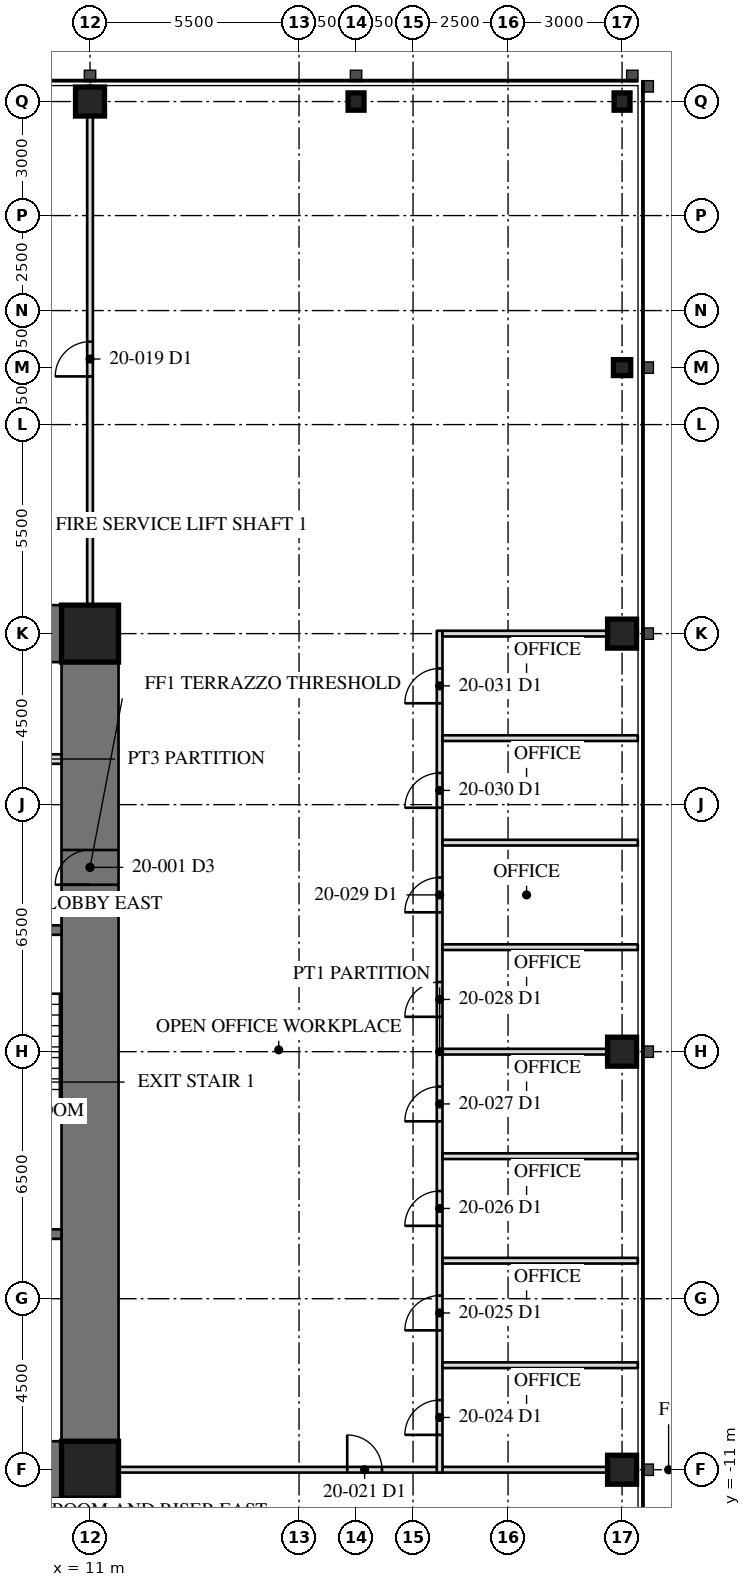
"""IFC4 building model, lengths in metres.
Left out: names, types, materials, properties, quantities, classifications, styles, units other than length and angle.
Written with IfcOpenShell. Run it as: python <this file> out.ifc"""

import sys

from ifc_helpers import new_model, si_unit, direction, frame, frame_2d, origin, origin_2d, place, context, subcontext, project, spatial, rectangle, hollow_rectangle, i_section, extrude, element, fill, save


model = new_model("IFC4")
c1 = context("Model", 3, precision=1e-05, world=origin(), true_north=direction((0.0, 1.0)))
c2 = subcontext(c1, "Body", "Model", "MODEL_VIEW")
j1 = project(units=[si_unit("LENGTHUNIT", "METRE"), si_unit("PLANEANGLEUNIT", "RADIAN")], contexts=[c1])
p1 = place(None, origin())
s1 = spatial("IfcSite", under=j1, at=p1, CompositionType="ELEMENT")
p2 = place(p1, origin())
s2 = spatial("IfcBuilding", under=s1, at=p2, CompositionType="ELEMENT")
p3 = place(p2, frame((0.0, 0.0, 85.7)))
s3 = spatial("IfcBuildingStorey", under=s2, at=p3, CompositionType="ELEMENT", Elevation=85.7)
for number, where, z_axis, x_axis in (
    (1, (25.0, -11.0, 0.0), (0.0, 0.0, 1.0), (0.0, 1.0, 0.0)),
    (2, (25.0, 0.0, 0.0), (0.0, 0.0, 1.0), (0.0, 1.0, 0.0)),
    (3, (25.0, 11.0, 0.0), (0.0, 0.0, 1.0), (0.0, 1.0, 0.0)),
):
    element("IfcColumn", number, at=place(p3, frame(where, z_axis=z_axis, x_axis=x_axis)), inside=s3, PredefinedType="COLUMN", context=c2, shape_type="SweptSolid", body=[
        extrude(hollow_rectangle(XDim=0.762, YDim=0.762, WallThickness=0.127, at=origin_2d()), origin(), (0.0, 0.0, 1.0), 4.1),
    ])
for number, where, z_axis, x_axis in (
    (4, (25.0, 18.0, 0.0), (0.0, 0.0, 1.0), (0.0, 1.0, 0.0)),
    (5, (25.0, 25.0, 0.0), (0.0, 0.0, 1.0), (1.0, 0.0, 0.0)),
    (6, (18.0, 25.0, 0.0), (0.0, 0.0, 1.0), (1.0, 0.0, 0.0)),
):
    element("IfcColumn", number, at=place(p3, frame(where, z_axis=z_axis, x_axis=x_axis)), inside=s3, PredefinedType="COLUMN", context=c2, shape_type="SweptSolid", body=[
        extrude(i_section(OverallWidth=0.419, OverallDepth=0.455, WebThickness=0.042, FlangeThickness=0.068, at=origin_2d()), origin(), (0.0, 0.0, 1.0), 4.1),
    ])
p4 = place(p3, frame((11.0, 25.0, 0.0), z_axis=(0.0, 0.0, 1.0), x_axis=(1.0, 0.0, 0.0)))
e7 = element("IfcColumn", 7, at=p4, inside=s3, PredefinedType="COLUMN", context=c2, shape_type="SweptSolid", body=[
    extrude(hollow_rectangle(XDim=0.762, YDim=0.762, WallThickness=0.127, at=origin_2d()), origin(), (0.0, 0.0, 1.0), 4.1),
])
p5 = place(p3, frame((11.0, -11.0, 0.0), z_axis=(0.0, 0.0, 1.0), x_axis=(0.0, 1.0, 0.0)))
e8 = element("IfcWall", 8, at=p5, inside=s3, PredefinedType="SHEAR", context=c2, shape_type="SweptSolid", body=[
    extrude(rectangle(XDim=22.0, YDim=1.5, at=frame_2d((11.0, 0.0))), origin(), (0.0, 0.0, 1.0), 4.1),
])
p6 = place(p5, frame((15.393, 0.0, 0.0)))
e9 = element("IfcOpeningElement", 9, at=p6, cuts=e8, PredefinedType="OPENING", context=c2, shape_type="SweptSolid", body=[
    extrude(rectangle(XDim=0.915, YDim=2.134, at=frame_2d((0.458, 1.067))), frame((0.0, 0.76, 0.0), z_axis=(0.0, -1.0, 0.0), x_axis=(1.0, 0.0, 0.0)), (0.0, 0.0, 1.0), 1.52),
])
for number, where, z_axis, x_axis in (
    (10, (11.0, 11.0, 0.0), (0.0, 0.0, 1.0), (-1.0, 0.0, 0.0)),
    (11, (6.5, -11.0, 0.0), (0.0, 0.0, 1.0), (1.0, 0.0, 0.0)),
):
    element("IfcWall", number, at=place(p3, frame(where, z_axis=z_axis, x_axis=x_axis)), inside=s3, PredefinedType="SHEAR", context=c2, shape_type="SweptSolid", body=[
        extrude(rectangle(XDim=4.5, YDim=1.5, at=frame_2d((2.25, 0.0))), origin(), (0.0, 0.0, 1.0), 4.1),
    ])
for number, where, z_axis, x_axis in (
    (12, (11.0, 11.0, 0.0), (0.0, 0.0, 1.0), (1.0, 0.0, 0.0)),
    (13, (11.0, -11.0, 0.0), (0.0, 0.0, 1.0), (1.0, 0.0, 0.0)),
):
    element("IfcColumn", number, at=place(p3, frame(where, z_axis=z_axis, x_axis=x_axis)), inside=s3, PredefinedType="COLUMN", context=c2, shape_type="SweptSolid", body=[
        extrude(hollow_rectangle(XDim=1.499, YDim=1.499, WallThickness=0.102, at=origin_2d()), origin(), (0.0, 0.0, 1.0), 4.1),
    ])
p7 = place(p3, frame((6.95, -4.8, 0.0), z_axis=(0.0, 0.0, 1.0), x_axis=(1.0, 0.0, 0.0)))
e14 = element("IfcWall", 14, at=p7, inside=s3, PredefinedType="SOLIDWALL", context=c2, shape_type="SweptSolid", body=[
    extrude(rectangle(XDim=3.3, YDim=0.25, at=frame_2d((1.65, 0.0))), origin(), (0.0, 0.0, 1.0), 3.91),
])
p8 = place(p3, frame((6.95, 3.2, 0.0), z_axis=(0.0, 0.0, 1.0), x_axis=(1.0, 0.0, 0.0)))
e15 = element("IfcWall", 15, at=p8, inside=s3, PredefinedType="SOLIDWALL", context=c2, shape_type="SweptSolid", body=[
    extrude(rectangle(XDim=3.3, YDim=0.25, at=frame_2d((1.65, 0.0))), origin(), (0.0, 0.0, 1.0), 3.91),
])
p9 = place(p8, frame((1.116, 0.0, 0.0)))
e16 = element("IfcOpeningElement", 16, at=p9, cuts=e15, PredefinedType="OPENING", context=c2, shape_type="SweptSolid", body=[
    extrude(rectangle(XDim=1.067, YDim=2.134, at=frame_2d((0.533, 1.067))), frame((0.0, 0.135, 0.0), z_axis=(0.0, -1.0, 0.0), x_axis=(1.0, 0.0, 0.0)), (0.0, 0.0, 1.0), 0.27),
])
p10 = place(p3, frame((6.95, 7.7, 0.0), z_axis=(0.0, 0.0, 1.0), x_axis=(1.0, 0.0, 0.0)))
e17 = element("IfcWall", 17, at=p10, inside=s3, PredefinedType="PARTITIONING", context=c2, shape_type="SweptSolid", body=[
    extrude(rectangle(XDim=3.3, YDim=0.25, at=frame_2d((1.65, 0.0))), origin(), (0.0, 0.0, 1.0), 3.91),
])
p11 = place(p10, frame((0.45, 0.0, 0.0)))
e18 = element("IfcOpeningElement", 18, at=p11, cuts=e17, PredefinedType="OPENING", context=c2, shape_type="SweptSolid", body=[
    extrude(rectangle(XDim=1.219, YDim=2.134, at=frame_2d((0.609, 1.067))), frame((0.0, 0.135, 0.0), z_axis=(0.0, -1.0, 0.0), x_axis=(1.0, 0.0, 0.0)), (0.0, 0.0, 1.0), 0.27),
])
p12 = place(p3, frame((11.0, 11.75, 0.0), z_axis=(0.0, 0.0, 1.0), x_axis=(0.0, 1.0, 0.0)))
e19 = element("IfcWall", 19, at=p12, inside=s3, PredefinedType="PARTITIONING", context=c2, shape_type="SweptSolid", body=[
    extrude(rectangle(XDim=13.665, YDim=0.15, at=frame_2d((6.833, 0.0))), origin(), (0.0, 0.0, 1.0), 3.301),
])
p13 = place(p12, frame((6.018, 0.0, 0.0)))
e20 = element("IfcOpeningElement", 20, at=p13, cuts=e19, PredefinedType="OPENING", context=c2, shape_type="SweptSolid", body=[
    extrude(rectangle(XDim=0.915, YDim=2.134, at=frame_2d((0.458, 1.067))), frame((0.0, 0.085, 0.0), z_axis=(0.0, -1.0, 0.0), x_axis=(1.0, 0.0, 0.0)), (0.0, 0.0, 1.0), 0.17),
])
p14 = place(p3, frame((11.75, -11.0, 0.0), z_axis=(0.0, 0.0, 1.0), x_axis=(1.0, 0.0, 0.0)))
e21 = element("IfcWall", 21, at=p14, inside=s3, PredefinedType="PARTITIONING", context=c2, shape_type="SweptSolid", body=[
    extrude(rectangle(XDim=13.665, YDim=0.15, at=frame_2d((6.833, 0.0))), origin(), (0.0, 0.0, 1.0), 3.301),
])
p15 = place(p14, frame((6.018, 0.0, 0.0)))
e22 = element("IfcOpeningElement", 22, at=p15, cuts=e21, PredefinedType="OPENING", context=c2, shape_type="SweptSolid", body=[
    extrude(rectangle(XDim=0.915, YDim=2.134, at=frame_2d((0.458, 1.067))), frame((0.0, 0.085, 0.0), z_axis=(0.0, -1.0, 0.0), x_axis=(1.0, 0.0, 0.0)), (0.0, 0.0, 1.0), 0.17),
])
p16 = place(p3, frame((20.2, -11.075, 0.0), z_axis=(0.0, 0.0, 1.0), x_axis=(0.0, 1.0, 0.0)))
e23 = element("IfcWall", 23, at=p16, inside=s3, PredefinedType="PARTITIONING", context=c2, shape_type="SweptSolid", body=[
    extrude(rectangle(XDim=22.15, YDim=0.15, at=frame_2d((11.075, 0.0))), origin(), (0.0, 0.0, 1.0), 3.91),
])
p17 = place(p16, frame((0.992, 0.0, 0.0)))
e24 = element("IfcOpeningElement", 24, at=p17, cuts=e23, PredefinedType="OPENING", context=c2, shape_type="SweptSolid", body=[
    extrude(rectangle(XDim=0.915, YDim=2.134, at=frame_2d((0.458, 1.067))), frame((0.0, 0.085, 0.0), z_axis=(0.0, -1.0, 0.0), x_axis=(1.0, 0.0, 0.0)), (0.0, 0.0, 1.0), 0.17),
])
p18 = place(p16, frame((3.742, 0.0, 0.0)))
e25 = element("IfcOpeningElement", 25, at=p18, cuts=e23, PredefinedType="OPENING", context=c2, shape_type="SweptSolid", body=[
    extrude(rectangle(XDim=0.915, YDim=2.134, at=frame_2d((0.458, 1.067))), frame((0.0, 0.085, 0.0), z_axis=(0.0, -1.0, 0.0), x_axis=(1.0, 0.0, 0.0)), (0.0, 0.0, 1.0), 0.17),
])
p19 = place(p16, frame((6.492, 0.0, 0.0)))
e26 = element("IfcOpeningElement", 26, at=p19, cuts=e23, PredefinedType="OPENING", context=c2, shape_type="SweptSolid", body=[
    extrude(rectangle(XDim=0.915, YDim=2.134, at=frame_2d((0.458, 1.067))), frame((0.0, 0.085, 0.0), z_axis=(0.0, -1.0, 0.0), x_axis=(1.0, 0.0, 0.0)), (0.0, 0.0, 1.0), 0.17),
])
p20 = place(p16, frame((9.242, 0.0, 0.0)))
e27 = element("IfcOpeningElement", 27, at=p20, cuts=e23, PredefinedType="OPENING", context=c2, shape_type="SweptSolid", body=[
    extrude(rectangle(XDim=0.915, YDim=2.134, at=frame_2d((0.458, 1.067))), frame((0.0, 0.085, 0.0), z_axis=(0.0, -1.0, 0.0), x_axis=(1.0, 0.0, 0.0)), (0.0, 0.0, 1.0), 0.17),
])
p21 = place(p16, frame((11.992, 0.0, 0.0)))
e28 = element("IfcOpeningElement", 28, at=p21, cuts=e23, PredefinedType="OPENING", context=c2, shape_type="SweptSolid", body=[
    extrude(rectangle(XDim=0.915, YDim=2.134, at=frame_2d((0.458, 1.067))), frame((0.0, 0.085, 0.0), z_axis=(0.0, -1.0, 0.0), x_axis=(1.0, 0.0, 0.0)), (0.0, 0.0, 1.0), 0.17),
])
p22 = place(p16, frame((14.742, 0.0, 0.0)))
e29 = element("IfcOpeningElement", 29, at=p22, cuts=e23, PredefinedType="OPENING", context=c2, shape_type="SweptSolid", body=[
    extrude(rectangle(XDim=0.915, YDim=2.134, at=frame_2d((0.458, 1.067))), frame((0.0, 0.085, 0.0), z_axis=(0.0, -1.0, 0.0), x_axis=(1.0, 0.0, 0.0)), (0.0, 0.0, 1.0), 0.17),
])
p23 = place(p16, frame((17.492, 0.0, 0.0)))
e30 = element("IfcOpeningElement", 30, at=p23, cuts=e23, PredefinedType="OPENING", context=c2, shape_type="SweptSolid", body=[
    extrude(rectangle(XDim=0.915, YDim=2.134, at=frame_2d((0.458, 1.067))), frame((0.0, 0.085, 0.0), z_axis=(0.0, -1.0, 0.0), x_axis=(1.0, 0.0, 0.0)), (0.0, 0.0, 1.0), 0.17),
])
p24 = place(p16, frame((20.242, 0.0, 0.0)))
e31 = element("IfcOpeningElement", 31, at=p24, cuts=e23, PredefinedType="OPENING", context=c2, shape_type="SweptSolid", body=[
    extrude(rectangle(XDim=0.915, YDim=2.134, at=frame_2d((0.458, 1.067))), frame((0.0, 0.085, 0.0), z_axis=(0.0, -1.0, 0.0), x_axis=(1.0, 0.0, 0.0)), (0.0, 0.0, 1.0), 0.17),
])
for number, where, z_axis, x_axis in (
    (32, (20.275, -8.25, 0.0), (0.0, 0.0, 1.0), (1.0, 0.0, 0.0)),
    (33, (20.275, -5.5, 0.0), (0.0, 0.0, 1.0), (1.0, 0.0, 0.0)),
    (34, (20.275, -2.75, 0.0), (0.0, 0.0, 1.0), (1.0, 0.0, 0.0)),
):
    element("IfcWall", number, at=place(p3, frame(where, z_axis=z_axis, x_axis=x_axis)), inside=s3, PredefinedType="PARTITIONING", context=c2, shape_type="SweptSolid", body=[
        extrude(rectangle(XDim=5.14, YDim=0.15, at=frame_2d((2.57, 0.0))), origin(), (0.0, 0.0, 1.0), 3.91),
    ])
p25 = place(p3, frame((20.275, 0.0, 0.0), z_axis=(0.0, 0.0, 1.0), x_axis=(1.0, 0.0, 0.0)))
e35 = element("IfcWall", 35, at=p25, inside=s3, PredefinedType="PARTITIONING", context=c2, shape_type="SweptSolid", body=[
    extrude(rectangle(XDim=5.14, YDim=0.15, at=frame_2d((2.57, 0.0))), origin(), (0.0, 0.0, 1.0), 3.301),
])
for number, where, z_axis, x_axis in (
    (36, (20.275, 2.75, 0.0), (0.0, 0.0, 1.0), (1.0, 0.0, 0.0)),
    (37, (20.275, 5.5, 0.0), (0.0, 0.0, 1.0), (1.0, 0.0, 0.0)),
    (38, (20.275, 8.25, 0.0), (0.0, 0.0, 1.0), (1.0, 0.0, 0.0)),
):
    element("IfcWall", number, at=place(p3, frame(where, z_axis=z_axis, x_axis=x_axis)), inside=s3, PredefinedType="PARTITIONING", context=c2, shape_type="SweptSolid", body=[
        extrude(rectangle(XDim=5.14, YDim=0.15, at=frame_2d((2.57, 0.0))), origin(), (0.0, 0.0, 1.0), 3.91),
    ])
p26 = place(p3, frame((20.275, 11.0, 0.0), z_axis=(0.0, 0.0, 1.0), x_axis=(1.0, 0.0, 0.0)))
e39 = element("IfcWall", 39, at=p26, inside=s3, PredefinedType="PARTITIONING", context=c2, shape_type="SweptSolid", body=[
    extrude(rectangle(XDim=5.14, YDim=0.15, at=frame_2d((2.57, 0.0))), origin(), (0.0, 0.0, 1.0), 3.301),
])
p27 = place(p6, origin())
e40 = element("IfcDoor", 40, at=p27, inside=s3, OperationType="SINGLE_SWING_RIGHT", PredefinedType="DOOR", context=c2, shape_type="SweptSolid", body=[
    extrude(rectangle(XDim=0.915, YDim=2.134, at=frame_2d((0.458, 1.067))), frame((0.0, -0.675, 0.0), z_axis=(0.0, -1.0, 0.0), x_axis=(1.0, 0.0, 0.0)), (0.0, 0.0, 1.0), 0.05),
])
fill(e9, e40)
p28 = place(p13, origin())
e41 = element("IfcDoor", 41, at=p28, inside=s3, OperationType="SINGLE_SWING_LEFT", PredefinedType="DOOR", context=c2, shape_type="SweptSolid", body=[
    extrude(rectangle(XDim=0.915, YDim=2.134, at=frame_2d((0.458, 1.067))), frame((0.0, 0.025, 0.0), z_axis=(0.0, -1.0, 0.0), x_axis=(1.0, 0.0, 0.0)), (0.0, 0.0, 1.0), 0.05),
])
fill(e20, e41)
p29 = place(p15, origin())
e42 = element("IfcDoor", 42, at=p29, inside=s3, OperationType="SINGLE_SWING_LEFT", PredefinedType="DOOR", context=c2, shape_type="SweptSolid", body=[
    extrude(rectangle(XDim=0.915, YDim=2.134, at=frame_2d((0.458, 1.067))), frame((0.0, 0.025, 0.0), z_axis=(0.0, -1.0, 0.0), x_axis=(1.0, 0.0, 0.0)), (0.0, 0.0, 1.0), 0.05),
])
fill(e22, e42)
p30 = place(p17, origin())
e43 = element("IfcDoor", 43, at=p30, inside=s3, OperationType="SINGLE_SWING_LEFT", PredefinedType="DOOR", context=c2, shape_type="SweptSolid", body=[
    extrude(rectangle(XDim=0.915, YDim=2.134, at=frame_2d((0.458, 1.067))), frame((0.0, 0.025, 0.0), z_axis=(0.0, -1.0, 0.0), x_axis=(1.0, 0.0, 0.0)), (0.0, 0.0, 1.0), 0.05),
])
fill(e24, e43)
p31 = place(p18, origin())
e44 = element("IfcDoor", 44, at=p31, inside=s3, OperationType="SINGLE_SWING_LEFT", PredefinedType="DOOR", context=c2, shape_type="SweptSolid", body=[
    extrude(rectangle(XDim=0.915, YDim=2.134, at=frame_2d((0.458, 1.067))), frame((0.0, 0.025, 0.0), z_axis=(0.0, -1.0, 0.0), x_axis=(1.0, 0.0, 0.0)), (0.0, 0.0, 1.0), 0.05),
])
fill(e25, e44)
p32 = place(p19, origin())
e45 = element("IfcDoor", 45, at=p32, inside=s3, OperationType="SINGLE_SWING_LEFT", PredefinedType="DOOR", context=c2, shape_type="SweptSolid", body=[
    extrude(rectangle(XDim=0.915, YDim=2.134, at=frame_2d((0.458, 1.067))), frame((0.0, 0.025, 0.0), z_axis=(0.0, -1.0, 0.0), x_axis=(1.0, 0.0, 0.0)), (0.0, 0.0, 1.0), 0.05),
])
fill(e26, e45)
p33 = place(p20, origin())
e46 = element("IfcDoor", 46, at=p33, inside=s3, OperationType="SINGLE_SWING_LEFT", PredefinedType="DOOR", context=c2, shape_type="SweptSolid", body=[
    extrude(rectangle(XDim=0.915, YDim=2.134, at=frame_2d((0.458, 1.067))), frame((0.0, 0.025, 0.0), z_axis=(0.0, -1.0, 0.0), x_axis=(1.0, 0.0, 0.0)), (0.0, 0.0, 1.0), 0.05),
])
fill(e27, e46)
p34 = place(p21, origin())
e47 = element("IfcDoor", 47, at=p34, inside=s3, OperationType="SINGLE_SWING_LEFT", PredefinedType="DOOR", context=c2, shape_type="SweptSolid", body=[
    extrude(rectangle(XDim=0.915, YDim=2.134, at=frame_2d((0.458, 1.067))), frame((0.0, 0.025, 0.0), z_axis=(0.0, -1.0, 0.0), x_axis=(1.0, 0.0, 0.0)), (0.0, 0.0, 1.0), 0.05),
])
fill(e28, e47)
p35 = place(p22, origin())
e48 = element("IfcDoor", 48, at=p35, inside=s3, OperationType="SINGLE_SWING_LEFT", PredefinedType="DOOR", context=c2, shape_type="SweptSolid", body=[
    extrude(rectangle(XDim=0.915, YDim=2.134, at=frame_2d((0.458, 1.067))), frame((0.0, 0.025, 0.0), z_axis=(0.0, -1.0, 0.0), x_axis=(1.0, 0.0, 0.0)), (0.0, 0.0, 1.0), 0.05),
])
fill(e29, e48)
p36 = place(p23, origin())
e49 = element("IfcDoor", 49, at=p36, inside=s3, OperationType="SINGLE_SWING_LEFT", PredefinedType="DOOR", context=c2, shape_type="SweptSolid", body=[
    extrude(rectangle(XDim=0.915, YDim=2.134, at=frame_2d((0.458, 1.067))), frame((0.0, 0.025, 0.0), z_axis=(0.0, -1.0, 0.0), x_axis=(1.0, 0.0, 0.0)), (0.0, 0.0, 1.0), 0.05),
])
fill(e30, e49)
p37 = place(p24, origin())
e50 = element("IfcDoor", 50, at=p37, inside=s3, OperationType="SINGLE_SWING_LEFT", PredefinedType="DOOR", context=c2, shape_type="SweptSolid", body=[
    extrude(rectangle(XDim=0.915, YDim=2.134, at=frame_2d((0.458, 1.067))), frame((0.0, 0.025, 0.0), z_axis=(0.0, -1.0, 0.0), x_axis=(1.0, 0.0, 0.0)), (0.0, 0.0, 1.0), 0.05),
])
fill(e31, e50)
save(model, sys.argv[1])
